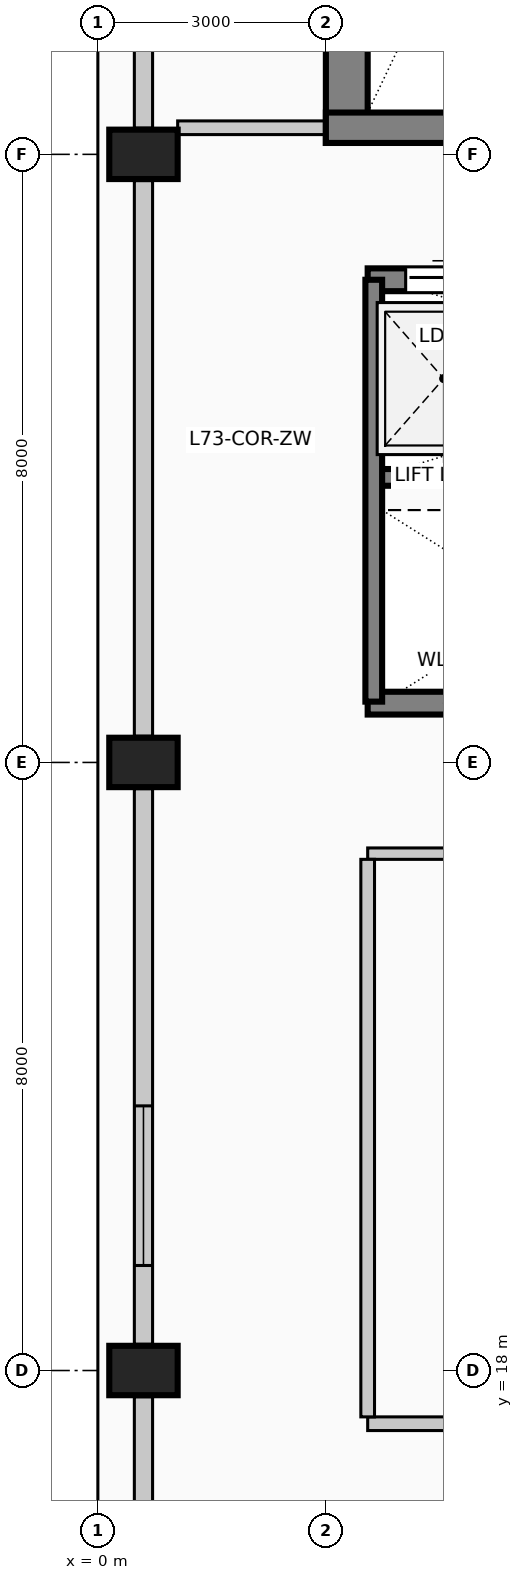
"""IFC4 building model, lengths in metres.
Left out: names, types, materials, properties, quantities, classifications, styles, units other than length and angle.
Written with IfcOpenShell. Run it as: python <this file> out.ifc"""

import sys

from ifc_helpers import new_model, si_unit, direction, frame, frame_2d, origin, origin_2d, place, context, subcontext, project, spatial, rectangle, extrude, element, fill, save


model = new_model("IFC4")
c1 = context("Model", 3, precision=1e-05, world=origin(), true_north=direction((0.0, 1.0)))
c2 = subcontext(c1, "Body", "Model", "MODEL_VIEW")
j1 = project(units=[si_unit("LENGTHUNIT", "METRE"), si_unit("PLANEANGLEUNIT", "RADIAN")], contexts=[c1])
p1 = place(None, origin())
s1 = spatial("IfcSite", under=j1, at=p1, CompositionType="ELEMENT")
p2 = place(p1, origin())
s2 = spatial("IfcBuilding", under=s1, at=p2, CompositionType="ELEMENT")
p3 = place(p2, frame((0.0, 0.0, 301.0)))
s3 = spatial("IfcBuildingStorey", under=s2, at=p3, CompositionType="ELEMENT", Elevation=301.0)
p4 = place(p3, frame((3.275, 34.15, 0.0), z_axis=(0.0, 0.0, 1.0), x_axis=(0.0, 1.0, 0.0)))
e1 = element("IfcWall", 1, at=p4, inside=s3, PredefinedType="SHEAR", context=c2, shape_type="SweptSolid", body=[
    extrude(rectangle(XDim=8.83, YDim=0.55, at=frame_2d((4.415, 0.0))), origin(), (0.0, 0.0, 1.0), 4.0),
])
p5 = place(p3, frame((3.0, 34.35, 0.0), z_axis=(0.0, 0.0, 1.0), x_axis=(1.0, 0.0, 0.0)))
e2 = element("IfcWall", 2, at=p5, inside=s3, PredefinedType="SHEAR", context=c2, shape_type="SweptSolid", body=[
    extrude(rectangle(XDim=4.71, YDim=0.4, at=frame_2d((2.355, 0.0))), origin(), (0.0, 0.0, 1.0), 4.0),
])
p6 = place(p5, frame((2.4, 0.0, 0.0)))
e3 = element("IfcOpeningElement", 3, at=p6, cuts=e2, PredefinedType="OPENING", context=c2, shape_type="SweptSolid", body=[
    extrude(rectangle(XDim=1.15, YDim=2.2, at=frame_2d((0.575, 1.1))), frame((0.0, 0.21, 0.0), z_axis=(0.0, -1.0, 0.0), x_axis=(1.0, 0.0, 0.0)), (0.0, 0.0, 1.0), 0.42),
])
for number, where, z_axis, x_axis in (
    (4, (0.6, 18.0, 0.0), (0.0, 0.0, 1.0), (0.0, 1.0, 0.0)),
    (5, (0.6, 26.0, 0.0), (0.0, 0.0, 1.0), (0.0, 1.0, 0.0)),
    (6, (0.6, 34.0, 0.0), (0.0, 0.0, 1.0), (0.0, 1.0, 0.0)),
):
    element("IfcColumn", number, at=place(p3, frame(where, z_axis=z_axis, x_axis=x_axis)), inside=s3, PredefinedType="COLUMN", context=c2, shape_type="SweptSolid", body=[
        extrude(rectangle(XDim=0.65, YDim=0.9, at=origin_2d()), origin(), (0.0, 0.0, 1.0), 4.0),
    ])
p7 = place(p3, frame((0.6, 10.345, 0.0), z_axis=(0.0, 0.0, 1.0), x_axis=(0.0, 1.0, 0.0)))
e7 = element("IfcWall", 7, at=p7, inside=s3, PredefinedType="SOLIDWALL", context=c2, shape_type="SweptSolid", body=[
    extrude(rectangle(XDim=7.31, YDim=0.24, at=frame_2d((3.655, 0.0))), origin(), (0.0, 0.0, 1.0), 3.025),
])
p8 = place(p7, frame((1.037, 0.0, 0.35)))
e8 = element("IfcOpeningElement", 8, at=p8, cuts=e7, PredefinedType="OPENING", context=c2, shape_type="SweptSolid", body=[
    extrude(rectangle(XDim=2.1, YDim=2.2, at=frame_2d((1.05, 1.1))), frame((0.0, 0.13, 0.0), z_axis=(0.0, -1.0, 0.0), x_axis=(1.0, 0.0, 0.0)), (0.0, 0.0, 1.0), 0.26),
])
p9 = place(p3, frame((0.6, 18.345, 0.0), z_axis=(0.0, 0.0, 1.0), x_axis=(0.0, 1.0, 0.0)))
e9 = element("IfcWall", 9, at=p9, inside=s3, PredefinedType="SOLIDWALL", context=c2, shape_type="SweptSolid", body=[
    extrude(rectangle(XDim=7.31, YDim=0.24, at=frame_2d((3.655, 0.0))), origin(), (0.0, 0.0, 1.0), 3.025),
])
p10 = place(p9, frame((1.037, 0.0, 0.35)))
e10 = element("IfcOpeningElement", 10, at=p10, cuts=e9, PredefinedType="OPENING", context=c2, shape_type="SweptSolid", body=[
    extrude(rectangle(XDim=2.1, YDim=2.2, at=frame_2d((1.05, 1.1))), frame((0.0, 0.13, 0.0), z_axis=(0.0, -1.0, 0.0), x_axis=(1.0, 0.0, 0.0)), (0.0, 0.0, 1.0), 0.26),
])
p11 = place(p3, frame((0.6, 26.345, 0.0), z_axis=(0.0, 0.0, 1.0), x_axis=(0.0, 1.0, 0.0)))
e11 = element("IfcWall", 11, at=p11, inside=s3, PredefinedType="SOLIDWALL", context=c2, shape_type="SweptSolid", body=[
    extrude(rectangle(XDim=7.31, YDim=0.24, at=frame_2d((3.655, 0.0))), origin(), (0.0, 0.0, 1.0), 3.025),
])
p12 = place(p3, frame((0.6, 34.345, 0.0), z_axis=(0.0, 0.0, 1.0), x_axis=(0.0, 1.0, 0.0)))
e12 = element("IfcWall", 12, at=p12, inside=s3, PredefinedType="SOLIDWALL", context=c2, shape_type="SweptSolid", body=[
    extrude(rectangle(XDim=7.71, YDim=0.24, at=frame_2d((3.855, 0.0))), origin(), (0.0, 0.0, 1.0), 3.025),
])
p13 = place(p3, frame((3.55, 32.35, 0.0), z_axis=(0.0, 0.0, 1.0), x_axis=(1.0, 0.0, 0.0)))
e13 = element("IfcWall", 13, at=p13, inside=s3, PredefinedType="SOLIDWALL", context=c2, shape_type="SweptSolid", body=[
    extrude(rectangle(XDim=2.1, YDim=0.3, at=frame_2d((1.05, 0.0))), origin(), (0.0, 0.0, 1.0), 4.0),
])
p14 = place(p13, frame((0.5, 0.0, 0.0)))
e14 = element("IfcOpeningElement", 14, at=p14, cuts=e13, PredefinedType="OPENING", context=c2, shape_type="SweptSolid", body=[
    extrude(rectangle(XDim=1.1, YDim=2.2, at=frame_2d((0.55, 1.1))), frame((0.0, 0.16, 0.0), z_axis=(0.0, -1.0, 0.0), x_axis=(1.0, 0.0, 0.0)), (0.0, 0.0, 1.0), 0.32),
])
p15 = place(p3, frame((5.65, 26.78, 0.0), z_axis=(0.0, 0.0, 1.0), x_axis=(-1.0, 0.0, 0.0)))
e15 = element("IfcWall", 15, at=p15, inside=s3, PredefinedType="SOLIDWALL", context=c2, shape_type="SweptSolid", body=[
    extrude(rectangle(XDim=2.1, YDim=0.3, at=frame_2d((1.05, 0.0))), origin(), (0.0, 0.0, 1.0), 4.0),
])
p16 = place(p3, frame((3.55, 29.75, 0.0), z_axis=(0.0, 0.0, 1.0), x_axis=(1.0, 0.0, 0.0)))
e16 = element("IfcWall", 16, at=p16, inside=s3, PredefinedType="SOLIDWALL", context=c2, shape_type="SweptSolid", body=[
    extrude(rectangle(XDim=8.65, YDim=0.22, at=frame_2d((4.325, 0.0))), origin(), (0.0, 0.0, 1.0), 4.0),
])
p17 = place(p3, frame((3.63, 26.8, 0.0), z_axis=(0.0, 0.0, 1.0), x_axis=(0.0, 1.0, 0.0)))
e17 = element("IfcWall", 17, at=p17, inside=s3, PredefinedType="SOLIDWALL", context=c2, shape_type="SweptSolid", body=[
    extrude(rectangle(XDim=5.55, YDim=0.22, at=frame_2d((2.775, 0.0))), origin(), (0.0, 0.0, 1.0), 4.0),
])
p18 = place(p3, frame((3.55, 17.3, 0.0), z_axis=(0.0, 0.0, 1.0), x_axis=(1.0, 0.0, 0.0)))
e18 = element("IfcWall", 18, at=p18, inside=s3, PredefinedType="PARTITIONING", context=c2, shape_type="SweptSolid", body=[
    extrude(rectangle(XDim=6.25, YDim=0.18, at=frame_2d((3.125, 0.0))), origin(), (0.0, 0.0, 1.0), 3.775),
])
p19 = place(p18, frame((2.6, 0.0, 0.0)))
e19 = element("IfcOpeningElement", 19, at=p19, cuts=e18, PredefinedType="OPENING", context=c2, shape_type="SweptSolid", body=[
    extrude(rectangle(XDim=1.05, YDim=2.15, at=frame_2d((0.525, 1.075))), frame((0.0, 0.1, 0.0), z_axis=(0.0, -1.0, 0.0), x_axis=(1.0, 0.0, 0.0)), (0.0, 0.0, 1.0), 0.2),
])
p20 = place(p3, frame((3.55, 24.8, 0.0), z_axis=(0.0, 0.0, 1.0), x_axis=(1.0, 0.0, 0.0)))
e20 = element("IfcWall", 20, at=p20, inside=s3, PredefinedType="PARTITIONING", context=c2, shape_type="SweptSolid", body=[
    extrude(rectangle(XDim=6.25, YDim=0.15, at=frame_2d((3.125, 0.0))), origin(), (0.0, 0.0, 1.0), 3.775),
])
p21 = place(p3, frame((1.05, 34.35, 0.0), z_axis=(0.0, 0.0, 1.0), x_axis=(1.0, 0.0, 0.0)))
e21 = element("IfcWall", 21, at=p21, inside=s3, PredefinedType="PARTITIONING", context=c2, shape_type="SweptSolid", body=[
    extrude(rectangle(XDim=1.95, YDim=0.18, at=frame_2d((0.975, 0.0))), origin(), (0.0, 0.0, 1.0), 3.775),
])
p22 = place(p3, frame((3.55, 17.39, 0.0), z_axis=(0.0, 0.0, 1.0), x_axis=(0.0, 1.0, 0.0)))
e22 = element("IfcWall", 22, at=p22, inside=s3, PredefinedType="PARTITIONING", context=c2, shape_type="SweptSolid", body=[
    extrude(rectangle(XDim=7.335, YDim=0.18, at=frame_2d((3.667, 0.0))), origin(), (0.0, 0.0, 1.0), 3.775),
])
p23 = place(p10, origin())
e23 = element("IfcWindow", 23, at=p23, inside=s3, PartitioningType="SINGLE_PANEL", PredefinedType="WINDOW", context=c2, shape_type="SweptSolid", body=[
    extrude(rectangle(XDim=2.1, YDim=2.2, at=frame_2d((1.05, 1.1))), frame((0.0, 0.03, 0.0), z_axis=(0.0, -1.0, 0.0), x_axis=(1.0, 0.0, 0.0)), (0.0, 0.0, 1.0), 0.06),
])
fill(e10, e23)
p24 = place(p14, origin())
e24 = element("IfcDoor", 24, at=p24, inside=s3, OperationType="SLIDING_TO_LEFT", PredefinedType="DOOR", context=c2, shape_type="SweptSolid", body=[
    extrude(rectangle(XDim=1.1, YDim=2.2, at=frame_2d((0.55, 1.1))), frame((0.0, 0.025, 0.0), z_axis=(0.0, -1.0, 0.0), x_axis=(1.0, 0.0, 0.0)), (0.0, 0.0, 1.0), 0.05),
])
fill(e14, e24)
save(model, sys.argv[1])
